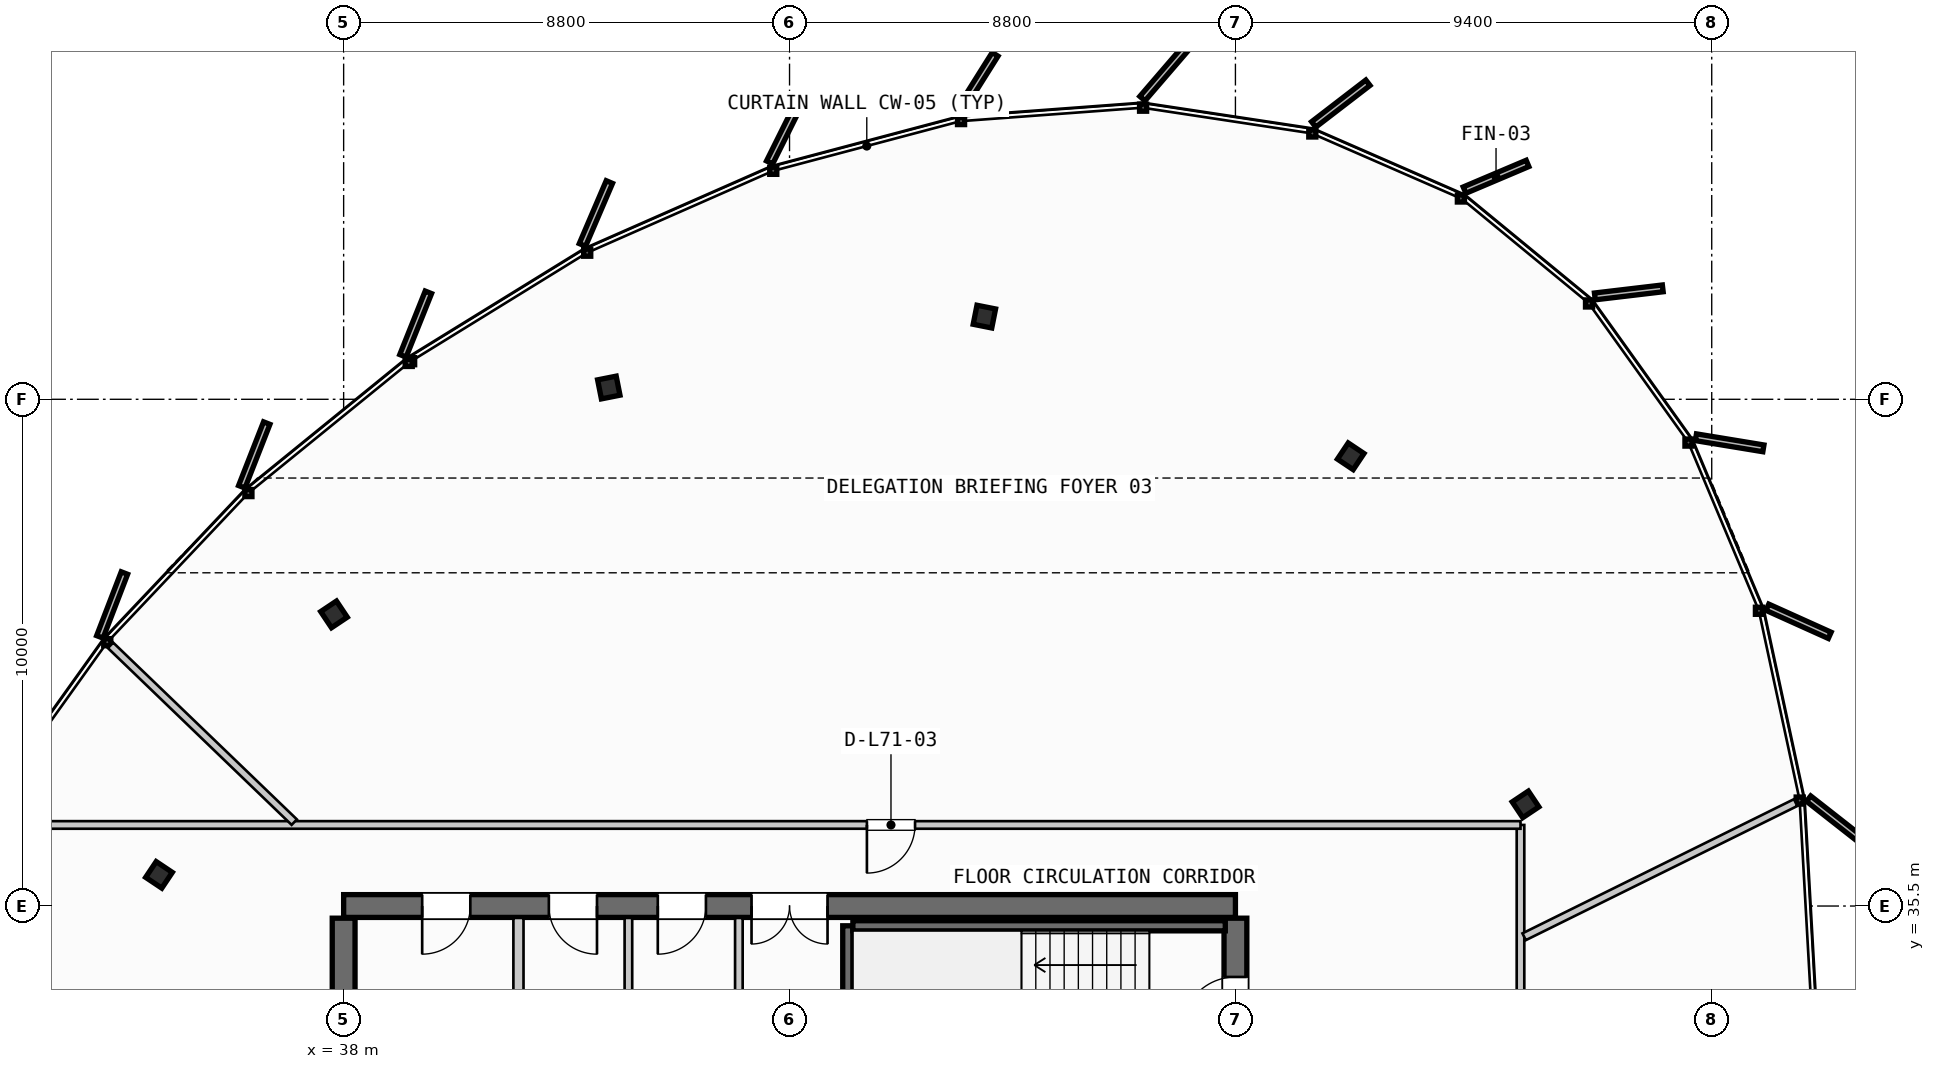
"""IFC4 building model, lengths in metres.
Left out: names, types, materials, properties, quantities, classifications, styles, units other than length and angle.
Written with IfcOpenShell. Run it as: python <this file> out.ifc"""

import sys

from ifc_helpers import new_model, si_unit, direction, frame, frame_2d, origin, origin_2d, place, context, subcontext, project, spatial, rectangle, i_section, extrude, source, transform, mapped, element, fill, save


model = new_model("IFC4")
c1 = context("Model", 3, precision=1e-05, world=origin(), true_north=direction((0.0, 1.0)))
c2 = subcontext(c1, "Body", "Model", "MODEL_VIEW")
j1 = project(units=[si_unit("LENGTHUNIT", "METRE"), si_unit("PLANEANGLEUNIT", "RADIAN")], contexts=[c1])
p1 = place(None, origin())
s1 = spatial("IfcSite", under=j1, at=p1, CompositionType="ELEMENT")
p2 = place(p1, origin())
s2 = spatial("IfcBuilding", under=s1, at=p2, CompositionType="ELEMENT")
p3 = place(p2, frame((0.0, 0.0, 269.8)))
s3 = spatial("IfcBuildingStorey", under=s2, at=p3, CompositionType="ELEMENT", Elevation=269.8)
p4 = place(p3, frame((55.6, 35.5, 0.0), z_axis=(0.0, 0.0, 1.0), x_axis=(-1.0, 0.0, 0.0)))
e1 = element("IfcWall", 1, at=p4, inside=s3, PredefinedType="SHEAR", context=c2, shape_type="SweptSolid", body=[
    extrude(rectangle(XDim=17.6, YDim=0.45, at=frame_2d((8.8, 0.0))), origin(), (0.0, 0.0, 1.0), 3.21),
])
p5 = place(p4, frame((8.05, 0.0, 0.0)))
e2 = element("IfcOpeningElement", 2, at=p5, cuts=e1, PredefinedType="OPENING", context=c2, shape_type="SweptSolid", body=[
    extrude(rectangle(XDim=1.5, YDim=2.2, at=frame_2d((0.75, 1.1))), frame((0.0, 0.235, 0.0), z_axis=(0.0, -1.0, 0.0), x_axis=(1.0, 0.0, 0.0)), (0.0, 0.0, 1.0), 0.47),
])
p6 = place(p4, frame((15.1, 0.0, 0.0)))
e3 = element("IfcOpeningElement", 3, at=p6, cuts=e1, PredefinedType="OPENING", context=c2, shape_type="SweptSolid", body=[
    extrude(rectangle(XDim=0.95, YDim=2.15, at=frame_2d((0.475, 1.075))), frame((0.0, 0.235, 0.0), z_axis=(0.0, -1.0, 0.0), x_axis=(1.0, 0.0, 0.0)), (0.0, 0.0, 1.0), 0.47),
])
p7 = place(p4, frame((12.6, 0.0, 0.0)))
e4 = element("IfcOpeningElement", 4, at=p7, cuts=e1, PredefinedType="OPENING", context=c2, shape_type="SweptSolid", body=[
    extrude(rectangle(XDim=0.95, YDim=2.15, at=frame_2d((0.475, 1.075))), frame((0.0, 0.235, 0.0), z_axis=(0.0, -1.0, 0.0), x_axis=(1.0, 0.0, 0.0)), (0.0, 0.0, 1.0), 0.47),
])
p8 = place(p4, frame((10.45, 0.0, 0.0)))
e5 = element("IfcOpeningElement", 5, at=p8, cuts=e1, PredefinedType="OPENING", context=c2, shape_type="SweptSolid", body=[
    extrude(rectangle(XDim=0.95, YDim=2.15, at=frame_2d((0.475, 1.075))), frame((0.0, 0.235, 0.0), z_axis=(0.0, -1.0, 0.0), x_axis=(1.0, 0.0, 0.0)), (0.0, 0.0, 1.0), 0.47),
])
p9 = place(p3, frame((38.0, 35.26, 0.0), z_axis=(0.0, 0.0, 1.0), x_axis=(0.0, -1.0, 0.0)))
e6 = element("IfcWall", 6, at=p9, inside=s3, PredefinedType="SHEAR", context=c2, shape_type="SweptSolid", body=[
    extrude(rectangle(XDim=14.92, YDim=0.45, at=frame_2d((7.46, 0.0))), origin(), (0.0, 0.0, 1.0), 3.21),
])
p10 = place(p9, frame((5.21, 0.0, 0.0)))
e7 = element("IfcOpeningElement", 7, at=p10, cuts=e6, PredefinedType="OPENING", context=c2, shape_type="SweptSolid", body=[
    extrude(rectangle(XDim=1.1, YDim=2.2, at=frame_2d((0.55, 1.1))), frame((0.0, 0.235, 0.0), z_axis=(0.0, -1.0, 0.0), x_axis=(1.0, 0.0, 0.0)), (0.0, 0.0, 1.0), 0.47),
])
p11 = place(p3, frame((55.6, 20.34, 0.0), z_axis=(0.0, 0.0, 1.0), x_axis=(0.0, 1.0, 0.0)))
e8 = element("IfcWall", 8, at=p11, inside=s3, PredefinedType="SHEAR", context=c2, shape_type="SweptSolid", body=[
    extrude(rectangle(XDim=14.92, YDim=0.45, at=frame_2d((7.46, 0.0))), origin(), (0.0, 0.0, 1.0), 3.21),
])
p12 = place(p11, frame((12.71, 0.0, 0.0)))
e9 = element("IfcOpeningElement", 9, at=p12, cuts=e8, PredefinedType="OPENING", context=c2, shape_type="SweptSolid", body=[
    extrude(rectangle(XDim=1.05, YDim=2.15, at=frame_2d((0.525, 1.075))), frame((0.0, 0.235, 0.0), z_axis=(0.0, -1.0, 0.0), x_axis=(1.0, 0.0, 0.0)), (0.0, 0.0, 1.0), 0.47),
])
p13 = place(p11, frame((8.61, 0.0, 0.0)))
e10 = element("IfcOpeningElement", 10, at=p13, cuts=e8, PredefinedType="OPENING", context=c2, shape_type="SweptSolid", body=[
    extrude(rectangle(XDim=1.1, YDim=2.2, at=frame_2d((0.55, 1.1))), frame((0.0, 0.235, 0.0), z_axis=(0.0, -1.0, 0.0), x_axis=(1.0, 0.0, 0.0)), (0.0, 0.0, 1.0), 0.47),
])
m1 = source(origin(), c2, "Body", "SweptSolid", [
    extrude(i_section(OverallWidth=0.374, OverallDepth=0.383, WebThickness=0.017, FlangeThickness=0.026, FilletRadius=0.015, at=origin_2d()), origin(), (0.0, 0.0, 1.0), 3.21),
])
for number, where, z_axis, x_axis in (
    (11, (61.326, 37.506, 0.0), (0.0, 0.0, 1.0), (0.831, 0.556, 0.0)),
    (12, (57.875, 44.375, 0.0), (0.0, 0.0, 1.0), (0.556, 0.831, 0.0)),
    (13, (50.645, 47.132, 0.0), (0.0, 0.0, 1.0), (0.195, 0.981, 0.0)),
    (14, (43.233, 45.732, 0.0), (0.0, 0.0, 1.0), (-0.195, 0.981, 0.0)),
    (15, (37.81, 41.255, 0.0), (0.0, 0.0, 1.0), (-0.556, 0.831, 0.0)),
    (16, (34.356, 36.115, 0.0), (0.0, 0.0, 1.0), (-0.831, 0.556, 0.0)),
):
    element("IfcColumn", number, at=place(p3, frame(where, z_axis=z_axis, x_axis=x_axis)), inside=s3, PredefinedType="COLUMN", context=c2, shape_type="MappedRepresentation", body=[
        mapped(m1, transform((0.0, 0.0, 0.0), scale=1.0)),
    ])
p14 = place(p3, frame((47.95, 32.05, 0.0), z_axis=(0.0, 0.0, 1.0), x_axis=(0.0, 1.0, 0.0)))
e17 = element("IfcWall", 17, at=p14, inside=s3, PredefinedType="SHEAR", context=c2, shape_type="SweptSolid", body=[
    extrude(rectangle(XDim=3.06, YDim=0.2, at=frame_2d((1.53, 0.0))), origin(), (0.0, 0.0, 1.0), 3.21),
])
p15 = place(p3, frame((48.05, 35.11, 0.0), z_axis=(0.0, 0.0, 1.0), x_axis=(1.0, 0.0, 0.0)))
e18 = element("IfcWall", 18, at=p15, inside=s3, PredefinedType="SHEAR", context=c2, shape_type="SweptSolid", body=[
    extrude(rectangle(XDim=7.35, YDim=0.2, at=frame_2d((3.675, 0.0))), origin(), (0.0, 0.0, 1.0), 3.21),
])
p16 = place(p3, frame((41.45, 31.85, 0.0), z_axis=(0.0, 0.0, 1.0), x_axis=(0.0, 1.0, 0.0)))
e19 = element("IfcWall", 19, at=p16, inside=s3, PredefinedType="PARTITIONING", context=c2, shape_type="SweptSolid", body=[
    extrude(rectangle(XDim=3.415, YDim=0.2, at=frame_2d((1.708, 0.0))), origin(), (0.0, 0.0, 1.0), 2.595),
])
p17 = place(p3, frame((45.8, 31.85, 0.0), z_axis=(0.0, 0.0, 1.0), x_axis=(0.0, 1.0, 0.0)))
e20 = element("IfcWall", 20, at=p17, inside=s3, PredefinedType="PARTITIONING", context=c2, shape_type="SweptSolid", body=[
    extrude(rectangle(XDim=3.415, YDim=0.15, at=frame_2d((1.708, 0.0))), origin(), (0.0, 0.0, 1.0), 2.595),
])
p18 = place(p3, frame((43.62, 31.85, 0.0), z_axis=(0.0, 0.0, 1.0), x_axis=(0.0, 1.0, 0.0)))
e21 = element("IfcWall", 21, at=p18, inside=s3, PredefinedType="PLUMBINGWALL", context=c2, shape_type="SweptSolid", body=[
    extrude(rectangle(XDim=3.415, YDim=0.15, at=frame_2d((1.708, 0.0))), origin(), (0.0, 0.0, 1.0), 2.595),
])
p19 = place(p3, frame((61.226, 18.269, 0.0), z_axis=(0.0, 0.0, 1.0), x_axis=(0.0, 1.0, 0.0)))
e22 = element("IfcWall", 22, at=p19, inside=s3, PredefinedType="PARTITIONING", context=c2, shape_type="SweptSolid", body=[
    extrude(rectangle(XDim=18.831, YDim=0.15, at=frame_2d((9.416, 0.0))), origin(), (0.0, 0.0, 1.0), 2.595),
])
p20 = place(p19, frame((8.125, 0.0, 0.0)))
e23 = element("IfcOpeningElement", 23, at=p20, cuts=e22, PredefinedType="OPENING", context=c2, shape_type="SweptSolid", body=[
    extrude(rectangle(XDim=0.95, YDim=2.15, at=frame_2d((0.475, 1.075))), frame((0.0, 0.085, 0.0), z_axis=(0.0, -1.0, 0.0), x_axis=(1.0, 0.0, 0.0)), (0.0, 0.0, 1.0), 0.17),
])
p21 = place(p3, frame((61.226, 37.1, 0.0), z_axis=(0.0, 0.0, 1.0), x_axis=(-1.0, 0.0, 0.0)))
e24 = element("IfcWall", 24, at=p21, inside=s3, PredefinedType="PARTITIONING", context=c2, shape_type="SweptSolid", body=[
    extrude(rectangle(XDim=29.156, YDim=0.15, at=frame_2d((14.578, 0.0))), origin(), (0.0, 0.0, 1.0), 2.595),
])
p22 = place(p21, frame((11.949, 0.0, 0.0)))
e25 = element("IfcOpeningElement", 25, at=p22, cuts=e24, PredefinedType="OPENING", context=c2, shape_type="SweptSolid", body=[
    extrude(rectangle(XDim=0.95, YDim=2.15, at=frame_2d((0.475, 1.075))), frame((0.0, 0.085, 0.0), z_axis=(0.0, -1.0, 0.0), x_axis=(1.0, 0.0, 0.0)), (0.0, 0.0, 1.0), 0.17),
])
p23 = place(p3, frame((61.298, 34.894, 0.0), z_axis=(0.0, 0.0, 1.0), x_axis=(0.896516981109, 0.443009370763, 0.0)))
e26 = element("IfcWall", 26, at=p23, inside=s3, PredefinedType="PARTITIONING", context=c2, shape_type="SweptSolid", body=[
    extrude(rectangle(XDim=5.977, YDim=0.15, at=frame_2d((2.988, 0.0))), origin(), (0.0, 0.0, 1.0), 2.595),
])
p24 = place(p3, frame((37.025, 37.156, 0.0), z_axis=(0.0, 0.0, 1.0), x_axis=(-0.720562610488, 0.693389879049, 0.0)))
e27 = element("IfcWall", 27, at=p24, inside=s3, PredefinedType="PARTITIONING", context=c2, shape_type="SweptSolid", body=[
    extrude(rectangle(XDim=5.031, YDim=0.15, at=frame_2d((2.516, 0.0))), origin(), (0.0, 0.0, 1.0), 2.595),
])
m2 = source(origin(), c2, "Body", "SweptSolid", [
    extrude(rectangle(XDim=1.05, YDim=2.15, at=frame_2d((0.525, 1.075))), frame((0.0, 0.025, 0.0), z_axis=(0.0, -1.0, 0.0), x_axis=(1.0, 0.0, 0.0)), (0.0, 0.0, 1.0), 0.05),
])
p25 = place(p12, origin())
e28 = element("IfcDoor", 28, at=p25, inside=s3, OperationType="SINGLE_SWING_LEFT", PredefinedType="DOOR", context=c2, shape_type="MappedRepresentation", body=[
    mapped(m2, transform((0.0, 0.0, 0.0), scale=1.0)),
])
fill(e9, e28)
m3 = source(origin(), c2, "Body", "SweptSolid", [
    extrude(rectangle(XDim=1.5, YDim=2.2, at=frame_2d((0.75, 1.1))), frame((0.0, 0.025, 0.0), z_axis=(0.0, -1.0, 0.0), x_axis=(1.0, 0.0, 0.0)), (0.0, 0.0, 1.0), 0.05),
])
p26 = place(p5, origin())
e29 = element("IfcDoor", 29, at=p26, inside=s3, OperationType="DOUBLE_DOOR_SINGLE_SWING", PredefinedType="DOOR", context=c2, shape_type="MappedRepresentation", body=[
    mapped(m3, transform((0.0, 0.0, 0.0), scale=1.0)),
])
fill(e2, e29)
m4 = source(origin(), c2, "Body", "SweptSolid", [
    extrude(rectangle(XDim=0.95, YDim=2.15, at=frame_2d((0.475, 1.075))), frame((0.0, 0.025, 0.0), z_axis=(0.0, -1.0, 0.0), x_axis=(1.0, 0.0, 0.0)), (0.0, 0.0, 1.0), 0.05),
])
p27 = place(p6, origin())
e30 = element("IfcDoor", 30, at=p27, inside=s3, OperationType="SINGLE_SWING_RIGHT", PredefinedType="DOOR", context=c2, shape_type="MappedRepresentation", body=[
    mapped(m4, transform((0.0, 0.0, 0.0), scale=1.0)),
])
fill(e3, e30)
p28 = place(p7, origin())
e31 = element("IfcDoor", 31, at=p28, inside=s3, OperationType="SINGLE_SWING_LEFT", PredefinedType="DOOR", context=c2, shape_type="MappedRepresentation", body=[
    mapped(m4, transform((0.0, 0.0, 0.0), scale=1.0)),
])
fill(e4, e31)
p29 = place(p8, origin())
e32 = element("IfcDoor", 32, at=p29, inside=s3, OperationType="SINGLE_SWING_RIGHT", PredefinedType="DOOR", context=c2, shape_type="MappedRepresentation", body=[
    mapped(m4, transform((0.0, 0.0, 0.0), scale=1.0)),
])
fill(e5, e32)
p30 = place(p22, origin())
e33 = element("IfcDoor", 33, at=p30, inside=s3, OperationType="SINGLE_SWING_RIGHT", PredefinedType="DOOR", context=c2, shape_type="MappedRepresentation", body=[
    mapped(m4, transform((0.0, 0.0, 0.0), scale=1.0)),
])
fill(e25, e33)
save(model, sys.argv[1])
